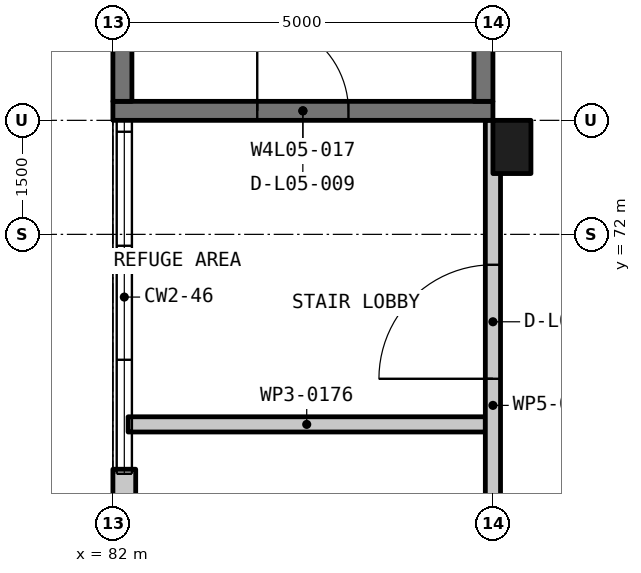
"""IFC4 building model, lengths in metres.
Left out: names, types, materials, properties, quantities, classifications, styles, units other than length and angle.
Written with IfcOpenShell. Run it as: python <this file> out.ifc"""

import sys

from ifc_helpers import new_model, si_unit, direction, frame, frame_2d, origin, origin_2d, place, context, subcontext, project, spatial, rectangle, extrude, element, fill, save


model = new_model("IFC4")
c1 = context("Model", 3, precision=1e-05, world=origin(), true_north=direction((0.0, 1.0)))
c2 = subcontext(c1, "Body", "Model", "MODEL_VIEW")
j1 = project(units=[si_unit("LENGTHUNIT", "METRE"), si_unit("PLANEANGLEUNIT", "RADIAN")], contexts=[c1])
p1 = place(None, origin())
s1 = spatial("IfcSite", under=j1, at=p1, CompositionType="ELEMENT")
p2 = place(p1, origin())
s2 = spatial("IfcBuilding", under=s1, at=p2, CompositionType="ELEMENT")
p3 = place(p2, frame((0.0, 0.0, 24.75)))
s3 = spatial("IfcBuildingStorey", under=s2, at=p3, CompositionType="ELEMENT", Elevation=24.75)
p4 = place(p3, frame((87.25, 73.15, -0.3), z_axis=(0.0, 0.0, 1.0), x_axis=(1.0, 0.0, 0.0)))
e1 = element("IfcColumn", 1, at=p4, inside=s3, PredefinedType="COLUMN", context=c2, shape_type="SweptSolid", body=[
    extrude(rectangle(XDim=0.5, YDim=0.7, at=origin_2d()), origin(), (0.0, 0.0, 1.0), 4.5),
])
p5 = place(p3, frame((82.0, 73.625, -0.3), z_axis=(0.0, 0.0, 1.0), x_axis=(1.0, 0.0, 0.0)))
e2 = element("IfcWall", 2, at=p5, inside=s3, PredefinedType="SHEAR", context=c2, shape_type="SweptSolid", body=[
    extrude(rectangle(XDim=5.0, YDim=0.25, at=frame_2d((2.5, 0.0))), origin(), (0.0, 0.0, 1.0), 4.5),
])
p6 = place(p5, frame((1.899, 0.0, 0.3)))
e3 = element("IfcOpeningElement", 3, at=p6, cuts=e2, PredefinedType="OPENING", context=c2, shape_type="SweptSolid", body=[
    extrude(rectangle(XDim=1.2, YDim=2.2, at=frame_2d((0.6, 1.1))), frame((0.0, 0.135, 0.0), z_axis=(0.0, -1.0, 0.0), x_axis=(1.0, 0.0, 0.0)), (0.0, 0.0, 1.0), 0.27),
])
for number, where, z_axis, x_axis in (
    (4, (86.875, 73.75, -0.3), (0.0, 0.0, 1.0), (0.0, 1.0, 0.0)),
    (5, (82.125, 73.75, -0.3), (0.0, 0.0, 1.0), (0.0, 1.0, 0.0)),
):
    element("IfcWall", number, at=place(p3, frame(where, z_axis=z_axis, x_axis=x_axis)), inside=s3, PredefinedType="SHEAR", context=c2, shape_type="SweptSolid", body=[
        extrude(rectangle(XDim=7.0, YDim=0.25, at=frame_2d((3.5, 0.0))), origin(), (0.0, 0.0, 1.0), 4.5),
    ])
p7 = place(p3, frame((82.15, 66.0, 0.0), z_axis=(0.0, 0.0, 1.0), x_axis=(0.0, 1.0, 0.0)))
e6 = element("IfcWall", 6, at=p7, inside=s3, PredefinedType="SOLIDWALL", context=c2, shape_type="SweptSolid", body=[
    extrude(rectangle(XDim=2.91, YDim=0.3, at=frame_2d((1.455, 0.0))), origin(), (0.0, 0.0, 1.0), 4.2),
])
p8 = place(p7, frame((1.15, 0.0, 0.0)))
e7 = element("IfcOpeningElement", 7, at=p8, cuts=e6, PredefinedType="OPENING", context=c2, shape_type="SweptSolid", body=[
    extrude(rectangle(XDim=1.2, YDim=2.2, at=frame_2d((0.6, 1.1))), frame((0.0, 0.16, 0.0), z_axis=(0.0, -1.0, 0.0), x_axis=(1.0, 0.0, 0.0)), (0.0, 0.0, 1.0), 0.32),
])
p9 = place(p3, frame((82.2, 69.5, 0.0), z_axis=(0.0, 0.0, 1.0), x_axis=(1.0, 0.0, 0.0)))
e8 = element("IfcWall", 8, at=p9, inside=s3, PredefinedType="PARTITIONING", context=c2, shape_type="SweptSolid", body=[
    extrude(rectangle(XDim=4.7, YDim=0.2, at=frame_2d((2.35, 0.0))), origin(), (0.0, 0.0, 1.0), 3.5),
])
p10 = place(p3, frame((87.0, 66.002, 0.0), z_axis=(0.0, 0.0, 1.0), x_axis=(0.0, 1.0, 0.0)))
e9 = element("IfcWall", 9, at=p10, inside=s3, PredefinedType="PARTITIONING", context=c2, shape_type="SweptSolid", body=[
    extrude(rectangle(XDim=7.496, YDim=0.2, at=frame_2d((3.748, 0.0))), origin(), (0.0, 0.0, 1.0), 3.4),
])
p11 = place(p10, frame((4.098, 0.0, 0.0)))
e10 = element("IfcOpeningElement", 10, at=p11, cuts=e9, PredefinedType="OPENING", context=c2, shape_type="SweptSolid", body=[
    extrude(rectangle(XDim=1.5, YDim=2.1, at=frame_2d((0.75, 1.05))), frame((0.0, 0.11, 0.0), z_axis=(0.0, -1.0, 0.0), x_axis=(1.0, 0.0, 0.0)), (0.0, 0.0, 1.0), 0.22),
])
p12 = place(p10, frame((1.548, 0.0, 0.0)))
e11 = element("IfcOpeningElement", 11, at=p12, cuts=e9, PredefinedType="OPENING", context=c2, shape_type="SweptSolid", body=[
    extrude(rectangle(XDim=1.0, YDim=2.1, at=frame_2d((0.5, 1.05))), frame((0.0, 0.11, 0.0), z_axis=(0.0, -1.0, 0.0), x_axis=(1.0, 0.0, 0.0)), (0.0, 0.0, 1.0), 0.22),
])
p13 = place(p6, origin())
e12 = element("IfcDoor", 12, at=p13, inside=s3, OperationType="SINGLE_SWING_RIGHT", PredefinedType="DOOR", context=c2, shape_type="SweptSolid", body=[
    extrude(rectangle(XDim=1.2, YDim=2.2, at=frame_2d((0.6, 1.1))), frame((0.0, 0.025, 0.0), z_axis=(0.0, -1.0, 0.0), x_axis=(1.0, 0.0, 0.0)), (0.0, 0.0, 1.0), 0.05),
])
fill(e3, e12)
p14 = place(p11, origin())
e13 = element("IfcDoor", 13, at=p14, inside=s3, OperationType="DOUBLE_DOOR_SINGLE_SWING", PredefinedType="DOOR", context=c2, shape_type="SweptSolid", body=[
    extrude(rectangle(XDim=1.5, YDim=2.1, at=frame_2d((0.75, 1.05))), frame((0.0, 0.025, 0.0), z_axis=(0.0, -1.0, 0.0), x_axis=(1.0, 0.0, 0.0)), (0.0, 0.0, 1.0), 0.05),
])
fill(e10, e13)
save(model, sys.argv[1])
